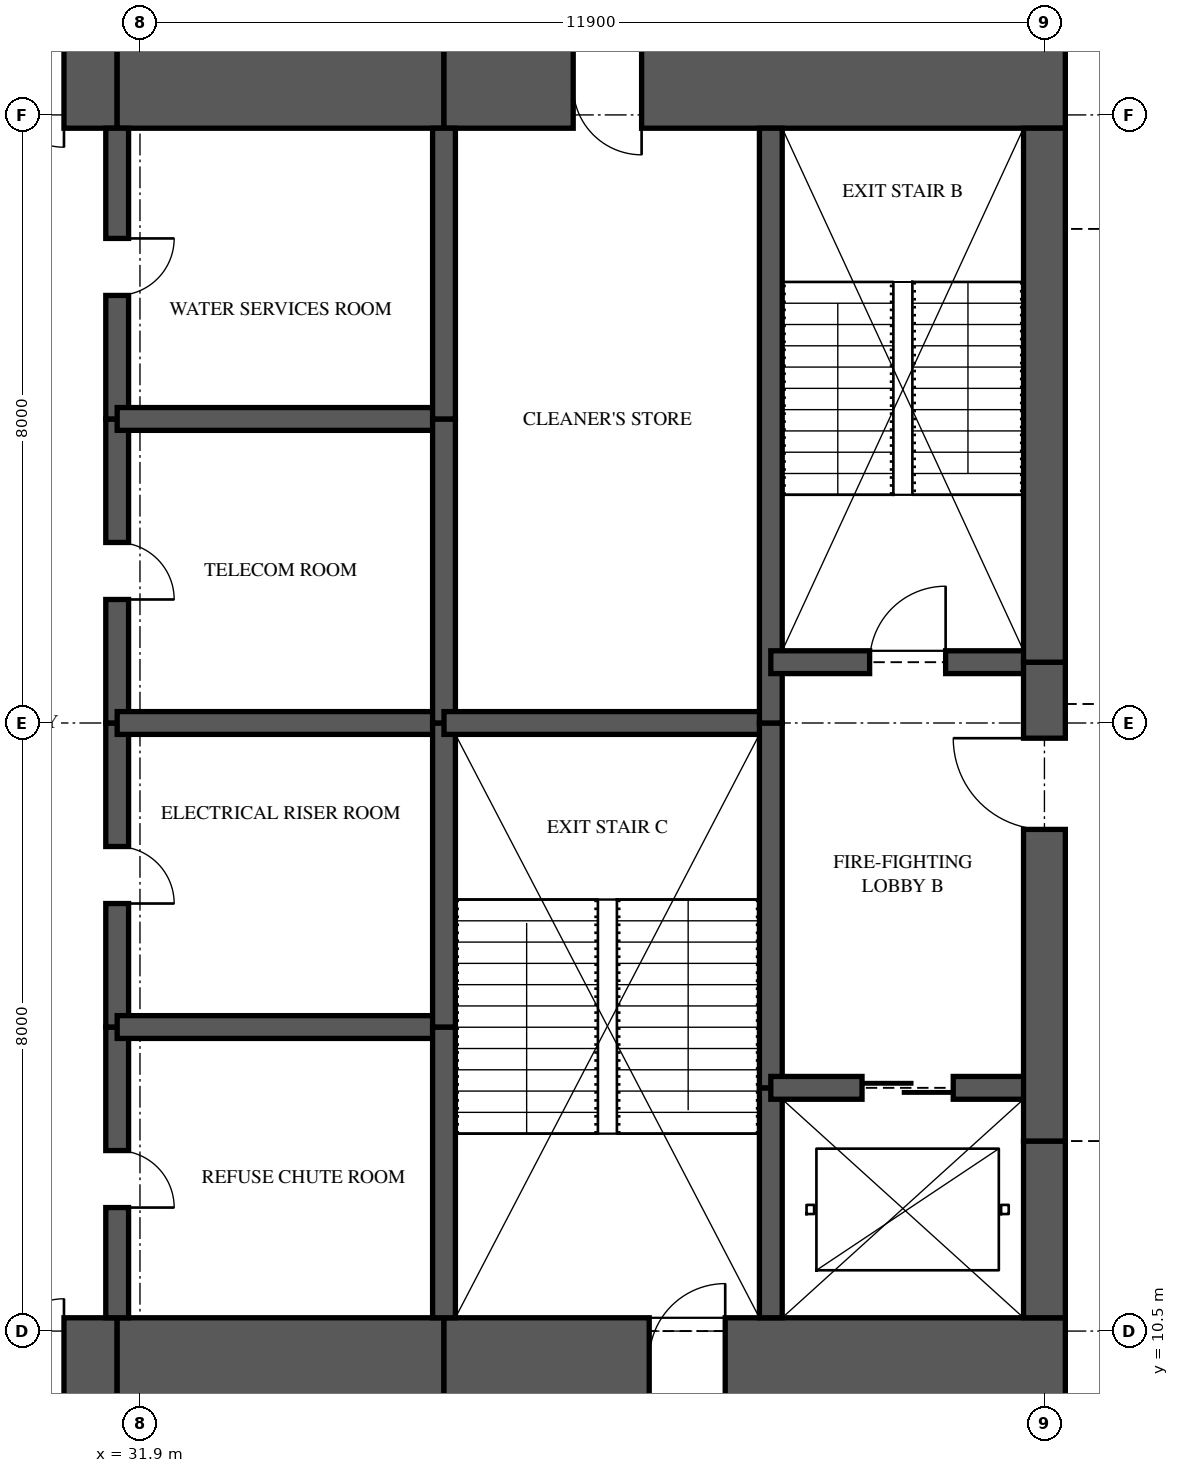
"""IFC4 building model, lengths in metres.
Left out: names, types, materials, properties, quantities, classifications, styles, units other than length and angle.
Written with IfcOpenShell. Run it as: python <this file> out.ifc"""

import sys

from ifc_helpers import new_model, si_unit, direction, frame, frame_2d, origin, place, context, subcontext, project, spatial, rectangle, extrude, element, fill, save


model = new_model("IFC4")
c1 = context("Model", 3, precision=1e-05, world=origin(), true_north=direction((0.0, 1.0)))
c2 = subcontext(c1, "Body", "Model", "MODEL_VIEW")
j1 = project(units=[si_unit("LENGTHUNIT", "METRE"), si_unit("PLANEANGLEUNIT", "RADIAN")], contexts=[c1])
p1 = place(None, origin())
s1 = spatial("IfcSite", under=j1, at=p1, CompositionType="ELEMENT")
p2 = place(p1, origin())
s2 = spatial("IfcBuilding", under=s1, at=p2, CompositionType="ELEMENT")
p3 = place(p2, frame((0.0, 0.0, 259.95)))
s3 = spatial("IfcBuildingStorey", under=s2, at=p3, CompositionType="ELEMENT", Elevation=259.95)
p4 = place(p3, frame((26.0, 10.125, 0.0), z_axis=(0.0, 0.0, 1.0), x_axis=(1.0, 0.0, 0.0)))
e1 = element("IfcWall", 1, at=p4, inside=s3, PredefinedType="SHEAR", context=c2, shape_type="SweptSolid", body=[
    extrude(rectangle(XDim=5.6, YDim=1.1, at=frame_2d((2.8, 0.0))), origin(), (0.0, 0.0, 1.0), 3.9),
])
p5 = place(p4, frame((3.3, 0.0, 0.0)))
e2 = element("IfcOpeningElement", 2, at=p5, cuts=e1, PredefinedType="OPENING", context=c2, shape_type="SweptSolid", body=[
    extrude(rectangle(XDim=1.6, YDim=2.1, at=frame_2d((0.8, 1.05))), frame((0.0, 0.56, 0.0), z_axis=(0.0, -1.0, 0.0), x_axis=(1.0, 0.0, 0.0)), (0.0, 0.0, 1.0), 1.12),
])
p6 = place(p3, frame((31.6, 10.125, 0.0), z_axis=(0.0, 0.0, 1.0), x_axis=(1.0, 0.0, 0.0)))
e3 = element("IfcWall", 3, at=p6, inside=s3, PredefinedType="SHEAR", context=c2, shape_type="SweptSolid", body=[
    extrude(rectangle(XDim=4.3, YDim=1.1, at=frame_2d((2.15, 0.0))), origin(), (0.0, 0.0, 1.0), 3.9),
])
p7 = place(p3, frame((35.9, 10.125, 0.0), z_axis=(0.0, 0.0, 1.0), x_axis=(1.0, 0.0, 0.0)))
e4 = element("IfcWall", 4, at=p7, inside=s3, PredefinedType="SHEAR", context=c2, shape_type="SweptSolid", body=[
    extrude(rectangle(XDim=8.175, YDim=1.1, at=frame_2d((4.087, 0.0))), origin(), (0.0, 0.0, 1.0), 3.9),
])
p8 = place(p7, frame((2.7, 0.0, 0.0)))
e5 = element("IfcOpeningElement", 5, at=p8, cuts=e4, PredefinedType="OPENING", context=c2, shape_type="SweptSolid", body=[
    extrude(rectangle(XDim=1.0, YDim=2.1, at=frame_2d((0.5, 1.05))), frame((0.0, 0.56, 0.0), z_axis=(0.0, -1.0, 0.0), x_axis=(1.0, 0.0, 0.0)), (0.0, 0.0, 1.0), 1.12),
])
p9 = place(p3, frame((44.075, 26.875, 0.0), z_axis=(0.0, 0.0, 1.0), x_axis=(-1.0, 0.0, 0.0)))
e6 = element("IfcWall", 6, at=p9, inside=s3, PredefinedType="SHEAR", context=c2, shape_type="SweptSolid", body=[
    extrude(rectangle(XDim=8.175, YDim=1.1, at=frame_2d((4.087, 0.0))), origin(), (0.0, 0.0, 1.0), 3.9),
])
p10 = place(p9, frame((5.575, 0.0, 0.0)))
e7 = element("IfcOpeningElement", 7, at=p10, cuts=e6, PredefinedType="OPENING", context=c2, shape_type="SweptSolid", body=[
    extrude(rectangle(XDim=0.9, YDim=2.1, at=frame_2d((0.45, 1.05))), frame((0.0, 0.56, 0.0), z_axis=(0.0, -1.0, 0.0), x_axis=(1.0, 0.0, 0.0)), (0.0, 0.0, 1.0), 1.12),
])
p11 = place(p3, frame((35.9, 26.875, 0.0), z_axis=(0.0, 0.0, 1.0), x_axis=(-1.0, 0.0, 0.0)))
e8 = element("IfcWall", 8, at=p11, inside=s3, PredefinedType="SHEAR", context=c2, shape_type="SweptSolid", body=[
    extrude(rectangle(XDim=4.3, YDim=1.1, at=frame_2d((2.15, 0.0))), origin(), (0.0, 0.0, 1.0), 3.9),
])
p12 = place(p3, frame((31.6, 26.875, 0.0), z_axis=(0.0, 0.0, 1.0), x_axis=(-1.0, 0.0, 0.0)))
e9 = element("IfcWall", 9, at=p12, inside=s3, PredefinedType="SHEAR", context=c2, shape_type="SweptSolid", body=[
    extrude(rectangle(XDim=5.6, YDim=1.1, at=frame_2d((2.8, 0.0))), origin(), (0.0, 0.0, 1.0), 3.9),
])
p13 = place(p12, frame((0.7, 0.0, 0.0)))
e10 = element("IfcOpeningElement", 10, at=p13, cuts=e9, PredefinedType="OPENING", context=c2, shape_type="SweptSolid", body=[
    extrude(rectangle(XDim=1.6, YDim=2.1, at=frame_2d((0.8, 1.05))), frame((0.0, 0.56, 0.0), z_axis=(0.0, -1.0, 0.0), x_axis=(1.0, 0.0, 0.0)), (0.0, 0.0, 1.0), 1.12),
])
p14 = place(p3, frame((43.8, 10.675, 0.0), z_axis=(0.0, 0.0, 1.0), x_axis=(0.0, 1.0, 0.0)))
e11 = element("IfcWall", 11, at=p14, inside=s3, PredefinedType="SHEAR", context=c2, shape_type="SweptSolid", body=[
    extrude(rectangle(XDim=2.325, YDim=0.55, at=frame_2d((1.163, 0.0))), origin(), (0.0, 0.0, 1.0), 3.9),
])
p15 = place(p3, frame((43.8, 13.0, 0.0), z_axis=(0.0, 0.0, 1.0), x_axis=(0.0, 1.0, 0.0)))
e12 = element("IfcWall", 12, at=p15, inside=s3, PredefinedType="SHEAR", context=c2, shape_type="SweptSolid", body=[
    extrude(rectangle(XDim=6.3, YDim=0.55, at=frame_2d((3.15, 0.0))), origin(), (0.0, 0.0, 1.0), 3.9),
])
p16 = place(p15, frame((4.1, 0.0, 0.0)))
e13 = element("IfcOpeningElement", 13, at=p16, cuts=e12, PredefinedType="OPENING", context=c2, shape_type="SweptSolid", body=[
    extrude(rectangle(XDim=1.2, YDim=2.2, at=frame_2d((0.6, 1.1))), frame((0.0, 0.285, 0.0), z_axis=(0.0, -1.0, 0.0), x_axis=(1.0, 0.0, 0.0)), (0.0, 0.0, 1.0), 0.57),
])
p17 = place(p3, frame((43.8, 19.3, 0.0), z_axis=(0.0, 0.0, 1.0), x_axis=(0.0, 1.0, 0.0)))
e14 = element("IfcWall", 14, at=p17, inside=s3, PredefinedType="SHEAR", context=c2, shape_type="SweptSolid", body=[
    extrude(rectangle(XDim=7.025, YDim=0.55, at=frame_2d((3.512, 0.0))), origin(), (0.0, 0.0, 1.0), 3.9),
])
p18 = place(p3, frame((31.6, 10.675, 0.0), z_axis=(0.0, 0.0, 1.0), x_axis=(0.0, 1.0, 0.0)))
e15 = element("IfcWall", 15, at=p18, inside=s3, PredefinedType="SHEAR", context=c2, shape_type="SweptSolid", body=[
    extrude(rectangle(XDim=3.825, YDim=0.3, at=frame_2d((1.913, 0.0))), origin(), (0.0, 0.0, 1.0), 3.9),
])
p19 = place(p18, frame((1.45, 0.0, 0.0)))
e16 = element("IfcOpeningElement", 16, at=p19, cuts=e15, PredefinedType="OPENING", context=c2, shape_type="SweptSolid", body=[
    extrude(rectangle(XDim=0.75, YDim=2.1, at=frame_2d((0.375, 1.05))), frame((0.0, 0.16, 0.0), z_axis=(0.0, -1.0, 0.0), x_axis=(1.0, 0.0, 0.0)), (0.0, 0.0, 1.0), 0.32),
])
p20 = place(p3, frame((31.6, 14.5, 0.0), z_axis=(0.0, 0.0, 1.0), x_axis=(0.0, 1.0, 0.0)))
e17 = element("IfcWall", 17, at=p20, inside=s3, PredefinedType="SHEAR", context=c2, shape_type="SweptSolid", body=[
    extrude(rectangle(XDim=4.0, YDim=0.3, at=frame_2d((2.0, 0.0))), origin(), (0.0, 0.0, 1.0), 3.9),
])
p21 = place(p20, frame((1.625, 0.0, 0.0)))
e18 = element("IfcOpeningElement", 18, at=p21, cuts=e17, PredefinedType="OPENING", context=c2, shape_type="SweptSolid", body=[
    extrude(rectangle(XDim=0.75, YDim=2.1, at=frame_2d((0.375, 1.05))), frame((0.0, 0.16, 0.0), z_axis=(0.0, -1.0, 0.0), x_axis=(1.0, 0.0, 0.0)), (0.0, 0.0, 1.0), 0.32),
])
p22 = place(p3, frame((31.6, 18.5, 0.0), z_axis=(0.0, 0.0, 1.0), x_axis=(0.0, 1.0, 0.0)))
e19 = element("IfcWall", 19, at=p22, inside=s3, PredefinedType="SHEAR", context=c2, shape_type="SweptSolid", body=[
    extrude(rectangle(XDim=4.0, YDim=0.3, at=frame_2d((2.0, 0.0))), origin(), (0.0, 0.0, 1.0), 3.9),
])
p23 = place(p22, frame((1.625, 0.0, 0.0)))
e20 = element("IfcOpeningElement", 20, at=p23, cuts=e19, PredefinedType="OPENING", context=c2, shape_type="SweptSolid", body=[
    extrude(rectangle(XDim=0.75, YDim=2.1, at=frame_2d((0.375, 1.05))), frame((0.0, 0.16, 0.0), z_axis=(0.0, -1.0, 0.0), x_axis=(1.0, 0.0, 0.0)), (0.0, 0.0, 1.0), 0.32),
])
p24 = place(p3, frame((31.6, 22.5, 0.0), z_axis=(0.0, 0.0, 1.0), x_axis=(0.0, 1.0, 0.0)))
e21 = element("IfcWall", 21, at=p24, inside=s3, PredefinedType="SHEAR", context=c2, shape_type="SweptSolid", body=[
    extrude(rectangle(XDim=3.825, YDim=0.3, at=frame_2d((1.913, 0.0))), origin(), (0.0, 0.0, 1.0), 3.9),
])
p25 = place(p24, frame((1.625, 0.0, 0.0)))
e22 = element("IfcOpeningElement", 22, at=p25, cuts=e21, PredefinedType="OPENING", context=c2, shape_type="SweptSolid", body=[
    extrude(rectangle(XDim=0.75, YDim=2.1, at=frame_2d((0.375, 1.05))), frame((0.0, 0.16, 0.0), z_axis=(0.0, -1.0, 0.0), x_axis=(1.0, 0.0, 0.0)), (0.0, 0.0, 1.0), 0.32),
])
p26 = place(p3, frame((35.9, 10.675, 0.0), z_axis=(0.0, 0.0, 1.0), x_axis=(0.0, 1.0, 0.0)))
e23 = element("IfcWall", 23, at=p26, inside=s3, PredefinedType="SHEAR", context=c2, shape_type="SweptSolid", body=[
    extrude(rectangle(XDim=3.825, YDim=0.3, at=frame_2d((1.913, 0.0))), origin(), (0.0, 0.0, 1.0), 3.9),
])
for number, where, z_axis, x_axis in (
    (24, (35.9, 14.5, 0.0), (0.0, 0.0, 1.0), (0.0, 1.0, 0.0)),
    (25, (35.9, 18.5, 0.0), (0.0, 0.0, 1.0), (0.0, 1.0, 0.0)),
):
    element("IfcWall", number, at=place(p3, frame(where, z_axis=z_axis, x_axis=x_axis)), inside=s3, PredefinedType="SHEAR", context=c2, shape_type="SweptSolid", body=[
        extrude(rectangle(XDim=4.0, YDim=0.3, at=frame_2d((2.0, 0.0))), origin(), (0.0, 0.0, 1.0), 3.9),
    ])
p27 = place(p3, frame((35.9, 22.5, 0.0), z_axis=(0.0, 0.0, 1.0), x_axis=(0.0, 1.0, 0.0)))
e26 = element("IfcWall", 26, at=p27, inside=s3, PredefinedType="SHEAR", context=c2, shape_type="SweptSolid", body=[
    extrude(rectangle(XDim=3.825, YDim=0.3, at=frame_2d((1.913, 0.0))), origin(), (0.0, 0.0, 1.0), 3.9),
])
p28 = place(p3, frame((40.2, 10.675, 0.0), z_axis=(0.0, 0.0, 1.0), x_axis=(0.0, 1.0, 0.0)))
e27 = element("IfcWall", 27, at=p28, inside=s3, PredefinedType="SHEAR", context=c2, shape_type="SweptSolid", body=[
    extrude(rectangle(XDim=3.025, YDim=0.3, at=frame_2d((1.512, 0.0))), origin(), (0.0, 0.0, 1.0), 3.9),
])
p29 = place(p3, frame((40.2, 13.7, 0.0), z_axis=(0.0, 0.0, 1.0), x_axis=(0.0, 1.0, 0.0)))
e28 = element("IfcWall", 28, at=p29, inside=s3, PredefinedType="SHEAR", context=c2, shape_type="SweptSolid", body=[
    extrude(rectangle(XDim=4.8, YDim=0.3, at=frame_2d((2.4, 0.0))), origin(), (0.0, 0.0, 1.0), 3.9),
])
p30 = place(p3, frame((40.2, 18.5, 0.0), z_axis=(0.0, 0.0, 1.0), x_axis=(0.0, 1.0, 0.0)))
e29 = element("IfcWall", 29, at=p30, inside=s3, PredefinedType="SHEAR", context=c2, shape_type="SweptSolid", body=[
    extrude(rectangle(XDim=7.825, YDim=0.3, at=frame_2d((3.913, 0.0))), origin(), (0.0, 0.0, 1.0), 3.9),
])
for number, where, z_axis, x_axis in (
    (30, (31.6, 14.5, 0.0), (0.0, 0.0, 1.0), (1.0, 0.0, 0.0)),
    (31, (31.6, 18.5, 0.0), (0.0, 0.0, 1.0), (1.0, 0.0, 0.0)),
    (32, (31.6, 22.5, 0.0), (0.0, 0.0, 1.0), (1.0, 0.0, 0.0)),
):
    element("IfcWall", number, at=place(p3, frame(where, z_axis=z_axis, x_axis=x_axis)), inside=s3, PredefinedType="SHEAR", context=c2, shape_type="SweptSolid", body=[
        extrude(rectangle(XDim=4.3, YDim=0.3, at=frame_2d((2.15, 0.0))), origin(), (0.0, 0.0, 1.0), 3.9),
    ])
p31 = place(p3, frame((35.9, 18.5, 0.0), z_axis=(0.0, 0.0, 1.0), x_axis=(1.0, 0.0, 0.0)))
e33 = element("IfcWall", 33, at=p31, inside=s3, PredefinedType="SHEAR", context=c2, shape_type="SweptSolid", body=[
    extrude(rectangle(XDim=4.3, YDim=0.3, at=frame_2d((2.15, 0.0))), origin(), (0.0, 0.0, 1.0), 3.9),
])
p32 = place(p3, frame((40.2, 13.7, 0.0), z_axis=(0.0, 0.0, 1.0), x_axis=(1.0, 0.0, 0.0)))
e34 = element("IfcWall", 34, at=p32, inside=s3, PredefinedType="SHEAR", context=c2, shape_type="SweptSolid", body=[
    extrude(rectangle(XDim=3.6, YDim=0.3, at=frame_2d((1.8, 0.0))), origin(), (0.0, 0.0, 1.0), 3.9),
])
p33 = place(p32, frame((1.2, 0.0, 0.0)))
e35 = element("IfcOpeningElement", 35, at=p33, cuts=e34, PredefinedType="OPENING", context=c2, shape_type="SweptSolid", body=[
    extrude(rectangle(XDim=1.2, YDim=2.1, at=frame_2d((0.6, 1.05))), frame((0.0, 0.16, 0.0), z_axis=(0.0, -1.0, 0.0), x_axis=(1.0, 0.0, 0.0)), (0.0, 0.0, 1.0), 0.32),
])
p34 = place(p3, frame((40.2, 19.3, 0.0), z_axis=(0.0, 0.0, 1.0), x_axis=(1.0, 0.0, 0.0)))
e36 = element("IfcWall", 36, at=p34, inside=s3, PredefinedType="SHEAR", context=c2, shape_type="SweptSolid", body=[
    extrude(rectangle(XDim=3.6, YDim=0.3, at=frame_2d((1.8, 0.0))), origin(), (0.0, 0.0, 1.0), 3.9),
])
p35 = place(p34, frame((1.3, 0.0, 0.0)))
e37 = element("IfcOpeningElement", 37, at=p35, cuts=e36, PredefinedType="OPENING", context=c2, shape_type="SweptSolid", body=[
    extrude(rectangle(XDim=1.0, YDim=2.1, at=frame_2d((0.5, 1.05))), frame((0.0, 0.16, 0.0), z_axis=(0.0, -1.0, 0.0), x_axis=(1.0, 0.0, 0.0)), (0.0, 0.0, 1.0), 0.32),
])
p36 = place(p35, origin())
e38 = element("IfcDoor", 38, at=p36, inside=s3, OperationType="SINGLE_SWING_RIGHT", PredefinedType="DOOR", context=c2, shape_type="SweptSolid", body=[
    extrude(rectangle(XDim=1.0, YDim=2.1, at=frame_2d((0.5, 1.05))), frame((0.0, 0.025, 0.0), z_axis=(0.0, -1.0, 0.0), x_axis=(1.0, 0.0, 0.0)), (0.0, 0.0, 1.0), 0.05),
])
fill(e37, e38)
p37 = place(p16, origin())
e39 = element("IfcDoor", 39, at=p37, inside=s3, OperationType="SINGLE_SWING_RIGHT", PredefinedType="DOOR", context=c2, shape_type="SweptSolid", body=[
    extrude(rectangle(XDim=1.2, YDim=2.2, at=frame_2d((0.6, 1.1))), frame((0.0, 0.025, 0.0), z_axis=(0.0, -1.0, 0.0), x_axis=(1.0, 0.0, 0.0)), (0.0, 0.0, 1.0), 0.05),
])
fill(e13, e39)
p38 = place(p33, origin())
e40 = element("IfcDoor", 40, at=p38, inside=s3, OperationType="SLIDING_TO_LEFT", PredefinedType="DOOR", context=c2, shape_type="SweptSolid", body=[
    extrude(rectangle(XDim=1.2, YDim=2.1, at=frame_2d((0.6, 1.05))), frame((0.0, 0.025, 0.0), z_axis=(0.0, -1.0, 0.0), x_axis=(1.0, 0.0, 0.0)), (0.0, 0.0, 1.0), 0.05),
])
fill(e35, e40)
p39 = place(p5, origin())
e41 = element("IfcDoor", 41, at=p39, inside=s3, OperationType="DOUBLE_DOOR_SINGLE_SWING", PredefinedType="DOOR", context=c2, shape_type="SweptSolid", body=[
    extrude(rectangle(XDim=1.6, YDim=2.1, at=frame_2d((0.8, 1.05))), frame((0.0, 0.025, 0.0), z_axis=(0.0, -1.0, 0.0), x_axis=(1.0, 0.0, 0.0)), (0.0, 0.0, 1.0), 0.05),
])
fill(e2, e41)
p40 = place(p13, origin())
e42 = element("IfcDoor", 42, at=p40, inside=s3, OperationType="DOUBLE_DOOR_SINGLE_SWING", PredefinedType="DOOR", context=c2, shape_type="SweptSolid", body=[
    extrude(rectangle(XDim=1.6, YDim=2.1, at=frame_2d((0.8, 1.05))), frame((0.0, 0.025, 0.0), z_axis=(0.0, -1.0, 0.0), x_axis=(1.0, 0.0, 0.0)), (0.0, 0.0, 1.0), 0.05),
])
fill(e10, e42)
p41 = place(p19, frame((0.75, 0.0, 0.0), z_axis=(0.0, 0.0, 1.0), x_axis=(-1.0, 0.0, 0.0)))
e43 = element("IfcDoor", 43, at=p41, inside=s3, OperationType="SINGLE_SWING_RIGHT", PredefinedType="DOOR", context=c2, shape_type="SweptSolid", body=[
    extrude(rectangle(XDim=0.75, YDim=2.1, at=frame_2d((0.375, 1.05))), frame((0.0, 0.025, 0.0), z_axis=(0.0, -1.0, 0.0), x_axis=(1.0, 0.0, 0.0)), (0.0, 0.0, 1.0), 0.05),
])
fill(e16, e43)
p42 = place(p21, frame((0.75, 0.0, 0.0), z_axis=(0.0, 0.0, 1.0), x_axis=(-1.0, 0.0, 0.0)))
e44 = element("IfcDoor", 44, at=p42, inside=s3, OperationType="SINGLE_SWING_RIGHT", PredefinedType="DOOR", context=c2, shape_type="SweptSolid", body=[
    extrude(rectangle(XDim=0.75, YDim=2.1, at=frame_2d((0.375, 1.05))), frame((0.0, 0.025, 0.0), z_axis=(0.0, -1.0, 0.0), x_axis=(1.0, 0.0, 0.0)), (0.0, 0.0, 1.0), 0.05),
])
fill(e18, e44)
p43 = place(p23, frame((0.75, 0.0, 0.0), z_axis=(0.0, 0.0, 1.0), x_axis=(-1.0, 0.0, 0.0)))
e45 = element("IfcDoor", 45, at=p43, inside=s3, OperationType="SINGLE_SWING_RIGHT", PredefinedType="DOOR", context=c2, shape_type="SweptSolid", body=[
    extrude(rectangle(XDim=0.75, YDim=2.1, at=frame_2d((0.375, 1.05))), frame((0.0, 0.025, 0.0), z_axis=(0.0, -1.0, 0.0), x_axis=(1.0, 0.0, 0.0)), (0.0, 0.0, 1.0), 0.05),
])
fill(e20, e45)
p44 = place(p25, frame((0.75, 0.0, 0.0), z_axis=(0.0, 0.0, 1.0), x_axis=(-1.0, 0.0, 0.0)))
e46 = element("IfcDoor", 46, at=p44, inside=s3, OperationType="SINGLE_SWING_LEFT", PredefinedType="DOOR", context=c2, shape_type="SweptSolid", body=[
    extrude(rectangle(XDim=0.75, YDim=2.1, at=frame_2d((0.375, 1.05))), frame((0.0, 0.025, 0.0), z_axis=(0.0, -1.0, 0.0), x_axis=(1.0, 0.0, 0.0)), (0.0, 0.0, 1.0), 0.05),
])
fill(e22, e46)
p45 = place(p8, origin())
e47 = element("IfcDoor", 47, at=p45, inside=s3, OperationType="SINGLE_SWING_RIGHT", PredefinedType="DOOR", context=c2, shape_type="SweptSolid", body=[
    extrude(rectangle(XDim=1.0, YDim=2.1, at=frame_2d((0.5, 1.05))), frame((0.0, 0.025, 0.0), z_axis=(0.0, -1.0, 0.0), x_axis=(1.0, 0.0, 0.0)), (0.0, 0.0, 1.0), 0.05),
])
fill(e5, e47)
p46 = place(p10, origin())
e48 = element("IfcDoor", 48, at=p46, inside=s3, OperationType="SINGLE_SWING_LEFT", PredefinedType="DOOR", context=c2, shape_type="SweptSolid", body=[
    extrude(rectangle(XDim=0.9, YDim=2.1, at=frame_2d((0.45, 1.05))), frame((0.0, 0.47, 0.0), z_axis=(0.0, -1.0, 0.0), x_axis=(1.0, 0.0, 0.0)), (0.0, 0.0, 1.0), 0.8),
])
fill(e7, e48)
save(model, sys.argv[1])
